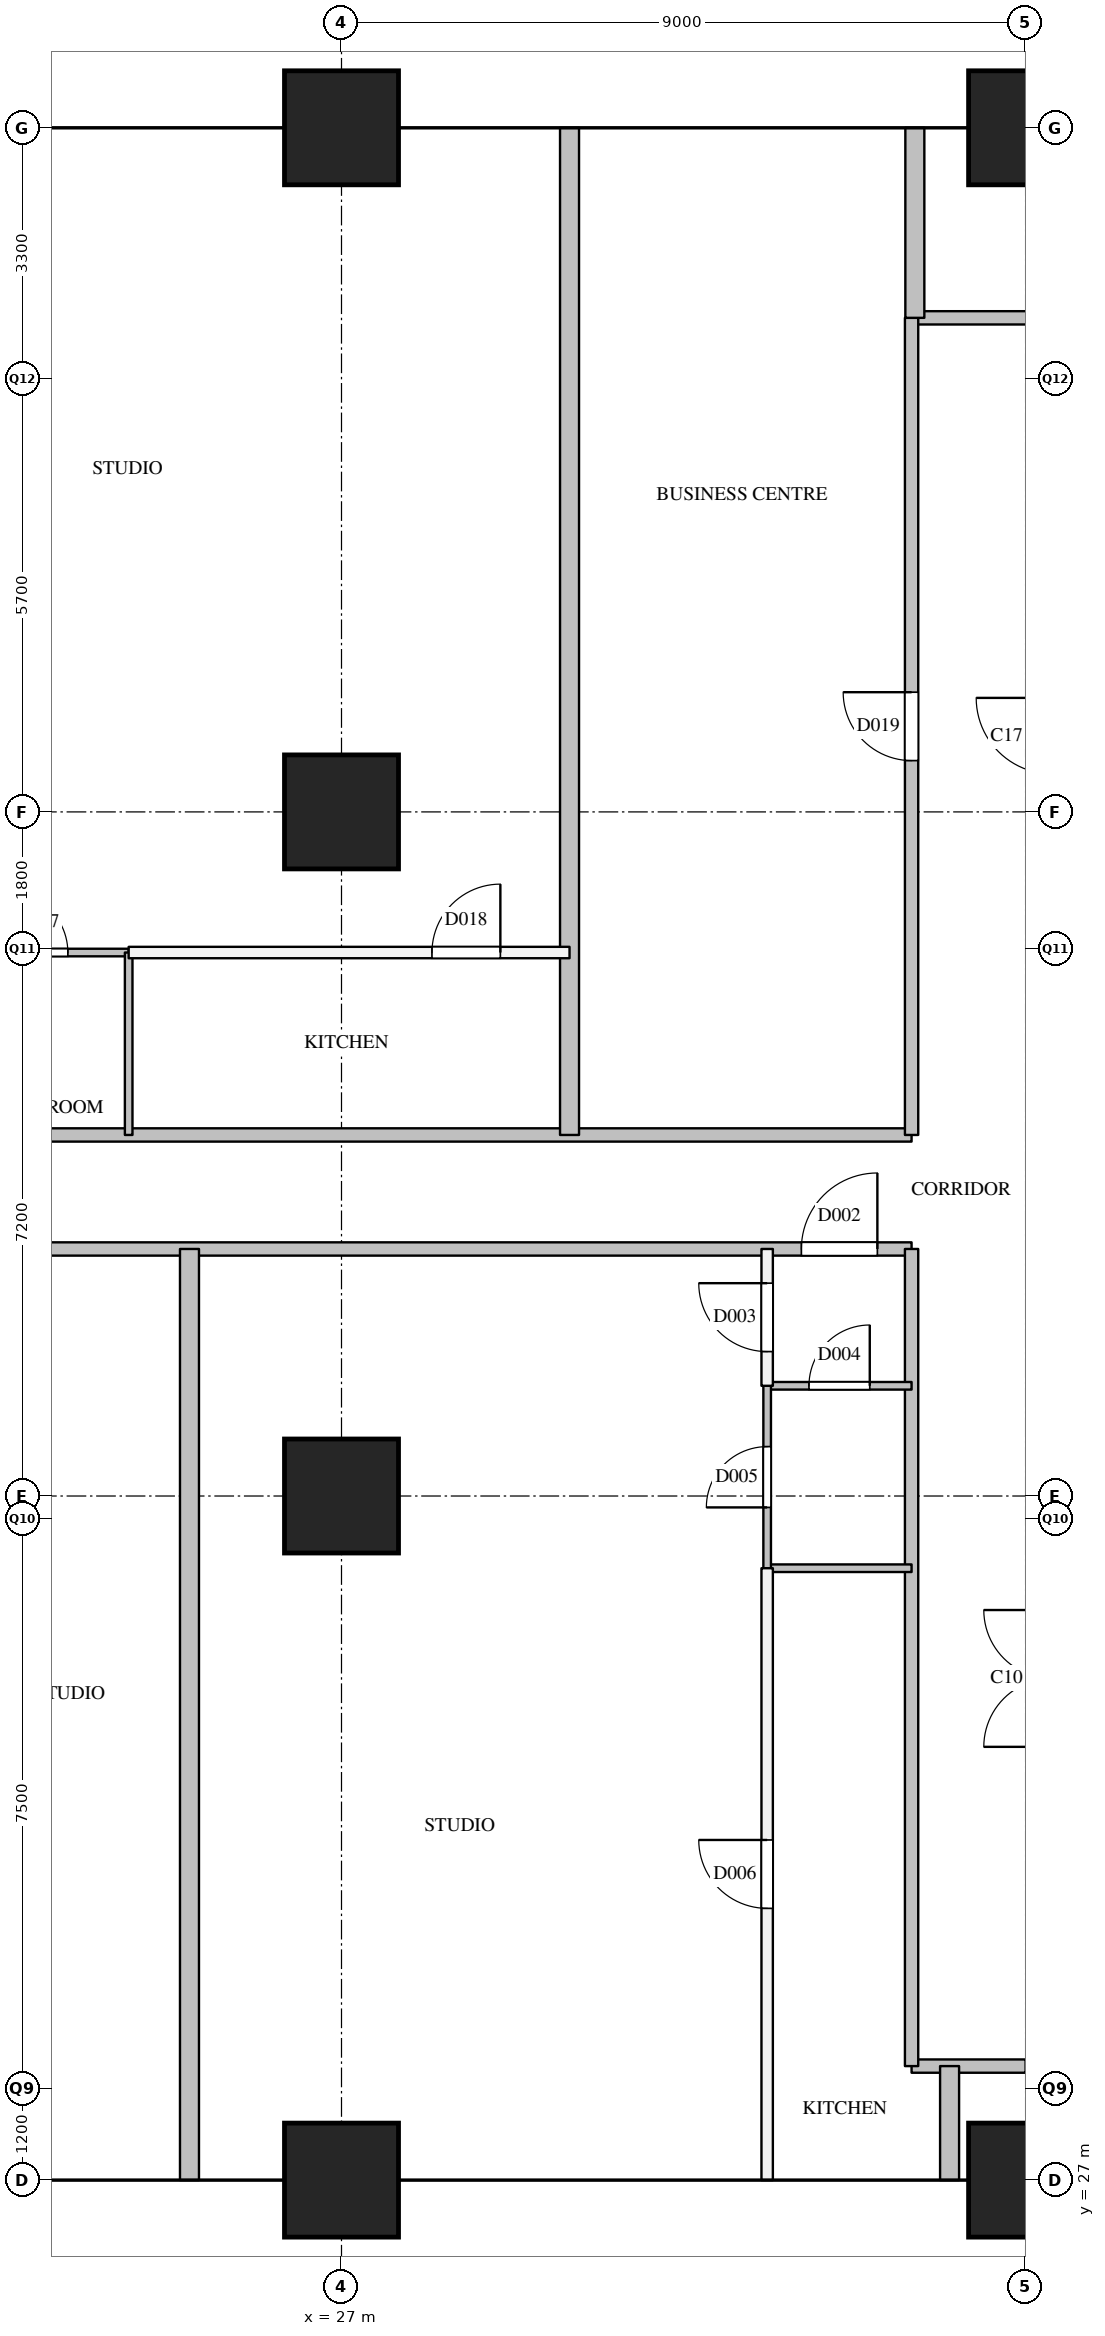
"""IFC4 building model, lengths in metres.
Left out: names, types, materials, properties, quantities, classifications, styles, units other than length and angle.
Written with IfcOpenShell. Run it as: python <this file> out.ifc"""

import sys

from ifc_helpers import new_model, si_unit, direction, frame, frame_2d, origin, origin_2d, place, context, subcontext, project, spatial, rectangle, extrude, element, fill, save


model = new_model("IFC4")
c1 = context("Model", 3, precision=1e-05, world=origin(), true_north=direction((0.0, 1.0)))
c2 = subcontext(c1, "Body", "Model", "MODEL_VIEW")
j1 = project(units=[si_unit("LENGTHUNIT", "METRE"), si_unit("PLANEANGLEUNIT", "RADIAN")], contexts=[c1])
p1 = place(None, origin())
s1 = spatial("IfcSite", under=j1, at=p1, CompositionType="ELEMENT")
p2 = place(p1, origin())
s2 = spatial("IfcBuilding", under=s1, at=p2, CompositionType="ELEMENT")
p3 = place(p2, frame((0.0, 0.0, 142.7)))
s3 = spatial("IfcBuildingStorey", under=s2, at=p3, CompositionType="ELEMENT", Elevation=142.7)
for number, where, z_axis, x_axis in (
    (1, (27.0, 27.0, 0.0), (0.0, 0.0, 1.0), (1.0, 0.0, 0.0)),
    (2, (27.0, 36.0, 0.0), (0.0, 0.0, 1.0), (1.0, 0.0, 0.0)),
    (3, (27.0, 45.0, 0.0), (0.0, 0.0, 1.0), (1.0, 0.0, 0.0)),
    (4, (27.0, 54.0, 0.0), (0.0, 0.0, 1.0), (1.0, 0.0, 0.0)),
    (5, (36.0, 27.0, 0.0), (0.0, 0.0, 1.0), (1.0, 0.0, 0.0)),
    (6, (36.0, 54.0, 0.0), (0.0, 0.0, 1.0), (1.0, 0.0, 0.0)),
):
    element("IfcColumn", number, at=place(p3, frame(where, z_axis=z_axis, x_axis=x_axis)), inside=s3, PredefinedType="COLUMN", context=c2, shape_type="SweptSolid", body=[
        extrude(rectangle(XDim=1.5, YDim=1.5, at=origin_2d()), origin(), (0.0, 0.0, 1.0), 3.9),
    ])
p4 = place(p3, frame((34.5, 28.5, 0.0), z_axis=(0.0, 0.0, 1.0), x_axis=(1.0, 0.0, 0.0)))
e7 = element("IfcWall", 7, at=p4, inside=s3, PredefinedType="PARTITIONING", context=c2, shape_type="SweptSolid", body=[
    extrude(rectangle(XDim=1.5, YDim=0.175, at=frame_2d((0.75, 0.0))), origin(), (0.0, 0.0, 1.0), 3.6),
])
p5 = place(p3, frame((19.5, 39.25, 0.0), z_axis=(0.0, 0.0, 1.0), x_axis=(1.0, 0.0, 0.0)))
e8 = element("IfcWall", 8, at=p5, inside=s3, PredefinedType="PARTITIONING", context=c2, shape_type="SweptSolid", body=[
    extrude(rectangle(XDim=15.0, YDim=0.175, at=frame_2d((7.5, 0.0))), origin(), (0.0, 0.0, 1.0), 2.6),
])
p6 = place(p5, frame((13.55, 0.0, 0.0)))
e9 = element("IfcOpeningElement", 9, at=p6, cuts=e8, PredefinedType="OPENING", context=c2, shape_type="SweptSolid", body=[
    extrude(rectangle(XDim=1.0, YDim=2.1, at=frame_2d((0.5, 1.05))), frame((0.0, 0.097, 0.0), z_axis=(0.0, -1.0, 0.0), x_axis=(1.0, 0.0, 0.0)), (0.0, 0.0, 1.0), 0.195),
])
p7 = place(p5, frame((0.7, 0.0, 0.0)))
e10 = element("IfcOpeningElement", 10, at=p7, cuts=e8, PredefinedType="OPENING", context=c2, shape_type="SweptSolid", body=[
    extrude(rectangle(XDim=1.0, YDim=2.1, at=frame_2d((0.5, 1.05))), frame((0.0, 0.097, 0.0), z_axis=(0.0, -1.0, 0.0), x_axis=(1.0, 0.0, 0.0)), (0.0, 0.0, 1.0), 0.195),
])
p8 = place(p3, frame((19.5, 40.75, 0.0), z_axis=(0.0, 0.0, 1.0), x_axis=(1.0, 0.0, 0.0)))
e11 = element("IfcWall", 11, at=p8, inside=s3, PredefinedType="PARTITIONING", context=c2, shape_type="SweptSolid", body=[
    extrude(rectangle(XDim=15.0, YDim=0.175, at=frame_2d((7.5, 0.0))), origin(), (0.0, 0.0, 1.0), 2.6),
])
p9 = place(p8, frame((0.9, 0.0, 0.0)))
e12 = element("IfcOpeningElement", 12, at=p9, cuts=e11, PredefinedType="OPENING", context=c2, shape_type="SweptSolid", body=[
    extrude(rectangle(XDim=1.0, YDim=2.1, at=frame_2d((0.5, 1.05))), frame((0.0, 0.097, 0.0), z_axis=(0.0, -1.0, 0.0), x_axis=(1.0, 0.0, 0.0)), (0.0, 0.0, 1.0), 0.195),
])
p10 = place(p3, frame((34.542, 51.5, 0.0), z_axis=(0.0, 0.0, 1.0), x_axis=(1.0, 0.0, 0.0)))
e13 = element("IfcWall", 13, at=p10, inside=s3, PredefinedType="PARTITIONING", context=c2, shape_type="SweptSolid", body=[
    extrude(rectangle(XDim=15.357, YDim=0.175, at=frame_2d((7.679, 0.0))), origin(), (0.0, 0.0, 1.0), 3.6),
])
p11 = place(p10, frame((4.729, 0.0, 0.0)))
e14 = element("IfcOpeningElement", 14, at=p11, cuts=e13, PredefinedType="OPENING", context=c2, shape_type="SweptSolid", body=[
    extrude(rectangle(XDim=1.0, YDim=2.1, at=frame_2d((0.5, 1.05))), frame((0.0, 0.097, 0.0), z_axis=(0.0, -1.0, 0.0), x_axis=(1.0, 0.0, 0.0)), (0.0, 0.0, 1.0), 0.195),
])
p12 = place(p3, frame((34.5, 28.5, 0.0), z_axis=(0.0, 0.0, 1.0), x_axis=(0.0, 1.0, 0.0)))
e15 = element("IfcWall", 15, at=p12, inside=s3, PredefinedType="PARTITIONING", context=c2, shape_type="SweptSolid", body=[
    extrude(rectangle(XDim=10.75, YDim=0.175, at=frame_2d((5.375, 0.0))), origin(), (0.0, 0.0, 1.0), 3.6),
])
p13 = place(p3, frame((34.5, 40.75, 0.0), z_axis=(0.0, 0.0, 1.0), x_axis=(0.0, 1.0, 0.0)))
e16 = element("IfcWall", 16, at=p13, inside=s3, PredefinedType="PARTITIONING", context=c2, shape_type="SweptSolid", body=[
    extrude(rectangle(XDim=10.75, YDim=0.175, at=frame_2d((5.375, 0.0))), origin(), (0.0, 0.0, 1.0), 3.6),
])
p14 = place(p13, frame((4.925, 0.0, 0.0)))
e17 = element("IfcOpeningElement", 17, at=p14, cuts=e16, PredefinedType="OPENING", context=c2, shape_type="SweptSolid", body=[
    extrude(rectangle(XDim=0.9, YDim=2.1, at=frame_2d((0.45, 1.05))), frame((0.0, 0.097, 0.0), z_axis=(0.0, -1.0, 0.0), x_axis=(1.0, 0.0, 0.0)), (0.0, 0.0, 1.0), 0.195),
])
p15 = place(p3, frame((24.2, 43.15, 0.0), z_axis=(0.0, 0.0, 1.0), x_axis=(1.0, 0.0, 0.0)))
e18 = element("IfcWall", 18, at=p15, inside=s3, PredefinedType="PARTITIONING", context=c2, shape_type="SweptSolid", body=[
    extrude(rectangle(XDim=5.8, YDim=0.15, at=frame_2d((2.9, 0.0))), origin(), (0.0, 0.0, 1.0), 2.6),
])
p16 = place(p15, frame((3.99, 0.0, 0.0)))
e19 = element("IfcOpeningElement", 19, at=p16, cuts=e18, PredefinedType="OPENING", context=c2, shape_type="SweptSolid", body=[
    extrude(rectangle(XDim=0.9, YDim=2.1, at=frame_2d((0.45, 1.05))), frame((0.0, 0.085, 0.0), z_axis=(0.0, -1.0, 0.0), x_axis=(1.0, 0.0, 0.0)), (0.0, 0.0, 1.0), 0.17),
])
p17 = place(p3, frame((32.6, 27.0, 0.0), z_axis=(0.0, 0.0, 1.0), x_axis=(0.0, 1.0, 0.0)))
e20 = element("IfcWall", 20, at=p17, inside=s3, PredefinedType="PARTITIONING", context=c2, shape_type="SweptSolid", body=[
    extrude(rectangle(XDim=8.05, YDim=0.15, at=frame_2d((4.025, 0.0))), origin(), (0.0, 0.0, 1.0), 2.6),
])
p18 = place(p17, frame((3.575, 0.0, 0.0)))
e21 = element("IfcOpeningElement", 21, at=p18, cuts=e20, PredefinedType="OPENING", context=c2, shape_type="SweptSolid", body=[
    extrude(rectangle(XDim=0.9, YDim=2.1, at=frame_2d((0.45, 1.05))), frame((0.0, 0.085, 0.0), z_axis=(0.0, -1.0, 0.0), x_axis=(1.0, 0.0, 0.0)), (0.0, 0.0, 1.0), 0.17),
])
p19 = place(p3, frame((32.6, 37.45, 0.0), z_axis=(0.0, 0.0, 1.0), x_axis=(0.0, 1.0, 0.0)))
e22 = element("IfcWall", 22, at=p19, inside=s3, PredefinedType="PARTITIONING", context=c2, shape_type="SweptSolid", body=[
    extrude(rectangle(XDim=1.8, YDim=0.15, at=frame_2d((0.9, 0.0))), origin(), (0.0, 0.0, 1.0), 3.6),
])
p20 = place(p19, frame((0.45, 0.0, 0.0)))
e23 = element("IfcOpeningElement", 23, at=p20, cuts=e22, PredefinedType="OPENING", context=c2, shape_type="SweptSolid", body=[
    extrude(rectangle(XDim=0.9, YDim=2.1, at=frame_2d((0.45, 1.05))), frame((0.0, 0.085, 0.0), z_axis=(0.0, -1.0, 0.0), x_axis=(1.0, 0.0, 0.0)), (0.0, 0.0, 1.0), 0.17),
])
p21 = place(p3, frame((25.0, 27.0, 0.0), z_axis=(0.0, 0.0, 1.0), x_axis=(0.0, 1.0, 0.0)))
e24 = element("IfcWall", 24, at=p21, inside=s3, PredefinedType="PARTITIONING", context=c2, shape_type="SweptSolid", body=[
    extrude(rectangle(XDim=12.25, YDim=0.25, at=frame_2d((6.125, 0.0))), origin(), (0.0, 0.0, 1.0), 2.6),
])
p22 = place(p3, frame((30.0, 40.75, 0.0), z_axis=(0.0, 0.0, 1.0), x_axis=(0.0, 1.0, 0.0)))
e25 = element("IfcWall", 25, at=p22, inside=s3, PredefinedType="PARTITIONING", context=c2, shape_type="SweptSolid", body=[
    extrude(rectangle(XDim=13.25, YDim=0.25, at=frame_2d((6.625, 0.0))), origin(), (0.0, 0.0, 1.0), 2.6),
])
p23 = place(p3, frame((34.543, 51.5, 0.0), z_axis=(0.0, 0.0, 1.0), x_axis=(0.0, 1.0, 0.0)))
e26 = element("IfcWall", 26, at=p23, inside=s3, PredefinedType="PARTITIONING", context=c2, shape_type="SweptSolid", body=[
    extrude(rectangle(XDim=2.5, YDim=0.25, at=frame_2d((1.25, 0.0))), origin(), (0.0, 0.0, 1.0), 2.6),
])
p24 = place(p3, frame((35.0, 27.0, 0.0), z_axis=(0.0, 0.0, 1.0), x_axis=(0.0, 1.0, 0.0)))
e27 = element("IfcWall", 27, at=p24, inside=s3, PredefinedType="PARTITIONING", context=c2, shape_type="SweptSolid", body=[
    extrude(rectangle(XDim=1.5, YDim=0.25, at=frame_2d((0.75, 0.0))), origin(), (0.0, 0.0, 1.0), 2.6),
])
p25 = place(p3, frame((32.6, 35.05, 0.0), z_axis=(0.0, 0.0, 1.0), x_axis=(1.0, 0.0, 0.0)))
e28 = element("IfcWall", 28, at=p25, inside=s3, PredefinedType="PARTITIONING", context=c2, shape_type="SweptSolid", body=[
    extrude(rectangle(XDim=1.9, YDim=0.1, at=frame_2d((0.95, 0.0))), origin(), (0.0, 0.0, 1.0), 3.6),
])
p26 = place(p3, frame((32.6, 37.45, 0.0), z_axis=(0.0, 0.0, 1.0), x_axis=(1.0, 0.0, 0.0)))
e29 = element("IfcWall", 29, at=p26, inside=s3, PredefinedType="PARTITIONING", context=c2, shape_type="SweptSolid", body=[
    extrude(rectangle(XDim=1.9, YDim=0.1, at=frame_2d((0.95, 0.0))), origin(), (0.0, 0.0, 1.0), 3.6),
])
p27 = place(p26, frame((0.55, 0.0, 0.0)))
e30 = element("IfcOpeningElement", 30, at=p27, cuts=e29, PredefinedType="OPENING", context=c2, shape_type="SweptSolid", body=[
    extrude(rectangle(XDim=0.8, YDim=2.1, at=frame_2d((0.4, 1.05))), frame((0.0, 0.06, 0.0), z_axis=(0.0, -1.0, 0.0), x_axis=(1.0, 0.0, 0.0)), (0.0, 0.0, 1.0), 0.12),
])
p28 = place(p3, frame((21.8, 43.15, 0.0), z_axis=(0.0, 0.0, 1.0), x_axis=(1.0, 0.0, 0.0)))
e31 = element("IfcWall", 31, at=p28, inside=s3, PredefinedType="PARTITIONING", context=c2, shape_type="SweptSolid", body=[
    extrude(rectangle(XDim=2.4, YDim=0.1, at=frame_2d((1.2, 0.0))), origin(), (0.0, 0.0, 1.0), 3.6),
])
p29 = place(p28, frame((0.8, 0.0, 0.0)))
e32 = element("IfcOpeningElement", 32, at=p29, cuts=e31, PredefinedType="OPENING", context=c2, shape_type="SweptSolid", body=[
    extrude(rectangle(XDim=0.8, YDim=2.1, at=frame_2d((0.4, 1.05))), frame((0.0, 0.06, 0.0), z_axis=(0.0, -1.0, 0.0), x_axis=(1.0, 0.0, 0.0)), (0.0, 0.0, 1.0), 0.12),
])
p30 = place(p3, frame((24.2, 40.75, 0.0), z_axis=(0.0, 0.0, 1.0), x_axis=(0.0, 1.0, 0.0)))
e33 = element("IfcWall", 33, at=p30, inside=s3, PredefinedType="PARTITIONING", context=c2, shape_type="SweptSolid", body=[
    extrude(rectangle(XDim=2.4, YDim=0.1, at=frame_2d((1.2, 0.0))), origin(), (0.0, 0.0, 1.0), 3.6),
])
p31 = place(p3, frame((32.6, 35.05, 0.0), z_axis=(0.0, 0.0, 1.0), x_axis=(0.0, 1.0, 0.0)))
e34 = element("IfcWall", 34, at=p31, inside=s3, PredefinedType="PARTITIONING", context=c2, shape_type="SweptSolid", body=[
    extrude(rectangle(XDim=2.4, YDim=0.1, at=frame_2d((1.2, 0.0))), origin(), (0.0, 0.0, 1.0), 3.6),
])
p32 = place(p31, frame((0.8, 0.0, 0.0)))
e35 = element("IfcOpeningElement", 35, at=p32, cuts=e34, PredefinedType="OPENING", context=c2, shape_type="SweptSolid", body=[
    extrude(rectangle(XDim=0.8, YDim=2.1, at=frame_2d((0.4, 1.05))), frame((0.0, 0.06, 0.0), z_axis=(0.0, -1.0, 0.0), x_axis=(1.0, 0.0, 0.0)), (0.0, 0.0, 1.0), 0.12),
])
p33 = place(p6, origin())
e36 = element("IfcDoor", 36, at=p33, inside=s3, OperationType="SINGLE_SWING_RIGHT", PredefinedType="DOOR", context=c2, shape_type="SweptSolid", body=[
    extrude(rectangle(XDim=1.0, YDim=2.1, at=frame_2d((0.5, 1.05))), frame((0.0, 0.025, 0.0), z_axis=(0.0, -1.0, 0.0), x_axis=(1.0, 0.0, 0.0)), (0.0, 0.0, 1.0), 0.05),
])
fill(e9, e36)
p34 = place(p20, origin())
e37 = element("IfcDoor", 37, at=p34, inside=s3, OperationType="SINGLE_SWING_RIGHT", PredefinedType="DOOR", context=c2, shape_type="SweptSolid", body=[
    extrude(rectangle(XDim=0.9, YDim=2.1, at=frame_2d((0.45, 1.05))), frame((0.0, 0.025, 0.0), z_axis=(0.0, -1.0, 0.0), x_axis=(1.0, 0.0, 0.0)), (0.0, 0.0, 1.0), 0.05),
])
fill(e23, e37)
p35 = place(p27, origin())
e38 = element("IfcDoor", 38, at=p35, inside=s3, OperationType="SINGLE_SWING_RIGHT", PredefinedType="DOOR", context=c2, shape_type="SweptSolid", body=[
    extrude(rectangle(XDim=0.8, YDim=2.1, at=frame_2d((0.4, 1.05))), frame((0.0, 0.025, 0.0), z_axis=(0.0, -1.0, 0.0), x_axis=(1.0, 0.0, 0.0)), (0.0, 0.0, 1.0), 0.05),
])
fill(e30, e38)
p36 = place(p32, origin())
e39 = element("IfcDoor", 39, at=p36, inside=s3, OperationType="SINGLE_SWING_LEFT", PredefinedType="DOOR", context=c2, shape_type="SweptSolid", body=[
    extrude(rectangle(XDim=0.8, YDim=2.1, at=frame_2d((0.4, 1.05))), frame((0.0, 0.025, 0.0), z_axis=(0.0, -1.0, 0.0), x_axis=(1.0, 0.0, 0.0)), (0.0, 0.0, 1.0), 0.05),
])
fill(e35, e39)
p37 = place(p18, origin())
e40 = element("IfcDoor", 40, at=p37, inside=s3, OperationType="SINGLE_SWING_RIGHT", PredefinedType="DOOR", context=c2, shape_type="SweptSolid", body=[
    extrude(rectangle(XDim=0.9, YDim=2.1, at=frame_2d((0.45, 1.05))), frame((0.0, 0.025, 0.0), z_axis=(0.0, -1.0, 0.0), x_axis=(1.0, 0.0, 0.0)), (0.0, 0.0, 1.0), 0.05),
])
fill(e21, e40)
p38 = place(p29, origin())
e41 = element("IfcDoor", 41, at=p38, inside=s3, OperationType="SINGLE_SWING_LEFT", PredefinedType="DOOR", context=c2, shape_type="SweptSolid", body=[
    extrude(rectangle(XDim=0.8, YDim=2.1, at=frame_2d((0.4, 1.05))), frame((0.0, 0.025, 0.0), z_axis=(0.0, -1.0, 0.0), x_axis=(1.0, 0.0, 0.0)), (0.0, 0.0, 1.0), 0.05),
])
fill(e32, e41)
p39 = place(p16, origin())
e42 = element("IfcDoor", 42, at=p39, inside=s3, OperationType="SINGLE_SWING_RIGHT", PredefinedType="DOOR", context=c2, shape_type="SweptSolid", body=[
    extrude(rectangle(XDim=0.9, YDim=2.1, at=frame_2d((0.45, 1.05))), frame((0.0, 0.025, 0.0), z_axis=(0.0, -1.0, 0.0), x_axis=(1.0, 0.0, 0.0)), (0.0, 0.0, 1.0), 0.05),
])
fill(e19, e42)
p40 = place(p14, origin())
e43 = element("IfcDoor", 43, at=p40, inside=s3, OperationType="SINGLE_SWING_RIGHT", PredefinedType="DOOR", context=c2, shape_type="SweptSolid", body=[
    extrude(rectangle(XDim=0.9, YDim=2.1, at=frame_2d((0.45, 1.05))), frame((0.0, 0.025, 0.0), z_axis=(0.0, -1.0, 0.0), x_axis=(1.0, 0.0, 0.0)), (0.0, 0.0, 1.0), 0.05),
])
fill(e17, e43)
save(model, sys.argv[1])
